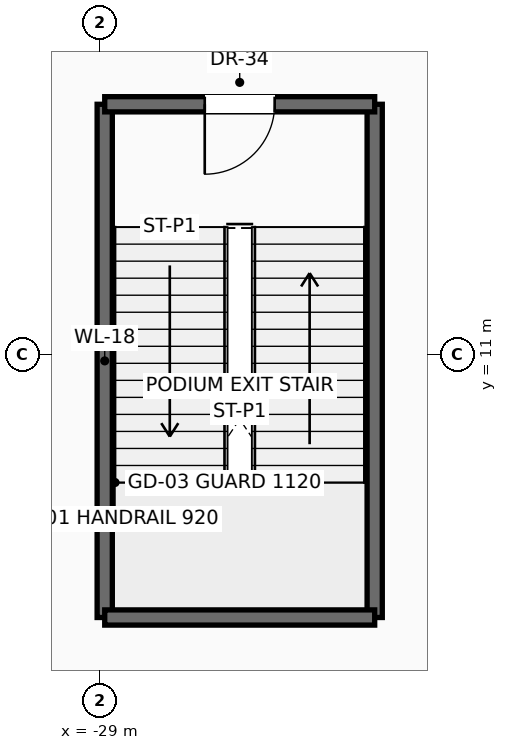
"""IFC4 building model, lengths in metres.
Left out: names, types, materials, properties, quantities, classifications, styles, units other than length and angle.
Written with IfcOpenShell. Run it as: python <this file> out.ifc"""

import sys

from ifc_helpers import new_model, si_unit, direction, frame, frame_2d, origin, place, context, subcontext, project, spatial, rectangle, extrude, source, transform, mapped, element, fill, save


model = new_model("IFC4")
c1 = context("Model", 3, precision=1e-05, world=origin(), true_north=direction((0.0, 1.0)))
c2 = subcontext(c1, "Body", "Model", "MODEL_VIEW")
j1 = project(units=[si_unit("LENGTHUNIT", "METRE"), si_unit("PLANEANGLEUNIT", "RADIAN")], contexts=[c1])
p1 = place(None, origin())
s1 = spatial("IfcSite", under=j1, at=p1, CompositionType="ELEMENT")
p2 = place(p1, origin())
s2 = spatial("IfcBuilding", under=s1, at=p2, CompositionType="ELEMENT")
p3 = place(p2, frame((0.0, 0.0, 11.0)))
s3 = spatial("IfcBuildingStorey", under=s2, at=p3, CompositionType="ELEMENT", Elevation=11.0)
for number, where, z_axis, x_axis in (
    (1, (-28.92, 6.68, 0.0), (0.0, 0.0, 1.0), (0.0, 1.0, 0.0)),
    (2, (-24.48, 6.68, 0.0), (0.0, 0.0, 1.0), (0.0, 1.0, 0.0)),
):
    element("IfcWall", number, at=place(p3, frame(where, z_axis=z_axis, x_axis=x_axis)), inside=s3, PredefinedType="SOLIDWALL", context=c2, shape_type="SweptSolid", body=[
        extrude(rectangle(XDim=8.44, YDim=0.25, at=frame_2d((4.22, 0.0))), origin(), (0.0, 0.0, 1.0), 5.185),
    ])
p4 = place(p3, frame((-28.92, 6.68, 0.0), z_axis=(0.0, 0.0, 1.0), x_axis=(1.0, 0.0, 0.0)))
e3 = element("IfcWall", 3, at=p4, inside=s3, PredefinedType="SOLIDWALL", context=c2, shape_type="SweptSolid", body=[
    extrude(rectangle(XDim=4.44, YDim=0.25, at=frame_2d((2.22, 0.0))), origin(), (0.0, 0.0, 1.0), 5.185),
])
p5 = place(p3, frame((-24.48, 15.12, 0.0), z_axis=(0.0, 0.0, 1.0), x_axis=(-1.0, 0.0, 0.0)))
e4 = element("IfcWall", 4, at=p5, inside=s3, PredefinedType="SOLIDWALL", context=c2, shape_type="SweptSolid", body=[
    extrude(rectangle(XDim=4.44, YDim=0.25, at=frame_2d((2.22, 0.0))), origin(), (0.0, 0.0, 1.0), 5.185),
])
p6 = place(p5, frame((1.645, 0.0, 0.0)))
e5 = element("IfcOpeningElement", 5, at=p6, cuts=e4, PredefinedType="OPENING", context=c2, shape_type="SweptSolid", body=[
    extrude(rectangle(XDim=1.15, YDim=2.2, at=frame_2d((0.575, 1.1))), frame((0.0, 0.135, 0.0), z_axis=(0.0, -1.0, 0.0), x_axis=(1.0, 0.0, 0.0)), (0.0, 0.0, 1.0), 0.27),
])
m1 = source(origin(), c2, "Body", "SweptSolid", [
    extrude(rectangle(XDim=1.15, YDim=2.2, at=frame_2d((0.575, 1.1))), frame((0.0, 0.025, 0.0), z_axis=(0.0, -1.0, 0.0), x_axis=(1.0, 0.0, 0.0)), (0.0, 0.0, 1.0), 0.05),
])
p7 = place(p6, origin())
e6 = element("IfcDoor", 6, at=p7, inside=s3, OperationType="SINGLE_SWING_RIGHT", PredefinedType="DOOR", context=c2, shape_type="MappedRepresentation", body=[
    mapped(m1, transform((0.0, 0.0, 0.0), scale=1.0)),
])
fill(e5, e6)
save(model, sys.argv[1])
